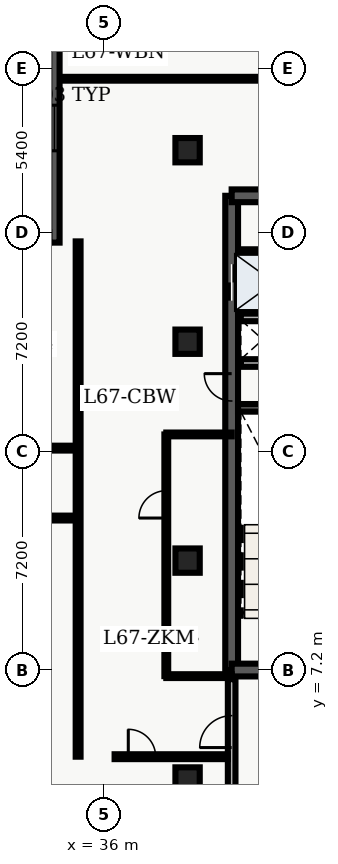
"""IFC4 building model, lengths in metres.
Left out: names, types, materials, properties, quantities, classifications, styles, units other than length and angle.
Written with IfcOpenShell. Run it as: python <this file> out.ifc"""

import sys

from ifc_helpers import new_model, entity, si_unit, converted_unit, direction, frame, origin_with_axes, origin_2d_with_axis, place, context, subcontext, project, spatial, polyline, rectangle, outline, extrude, element, fill, save


model = new_model("IFC4")
c1 = context("Model", 3, precision=1e-05, world=origin_with_axes(), true_north=direction((0.0, 1.0)))
c2 = subcontext(c1, "Body", "Model", "MODEL_VIEW")
j1 = project(units=[si_unit("LENGTHUNIT", "METRE"), converted_unit("PLANEANGLEUNIT", "DEGREE", entity("IfcPlaneAngleMeasure", 0.017), si_unit("PLANEANGLEUNIT", "RADIAN"), dimensions=[0, 0, 0, 0, 0, 0, 0])], contexts=[c1])
p1 = place(None, origin_with_axes())
s1 = spatial("IfcSite", under=j1, at=p1, CompositionType="ELEMENT")
p2 = place(p1, origin_with_axes())
s2 = spatial("IfcBuilding", under=s1, at=p2, CompositionType="ELEMENT")
p3 = place(p2, frame((0.0, 0.0, 272.4), z_axis=(0.0, 0.0, 1.0), x_axis=(1.0, 0.0, 0.0)))
s3 = spatial("IfcBuildingStorey", under=s2, at=p3, CompositionType="ELEMENT", Elevation=272.4)
p4 = place(p3, frame((40.2, 7.2, 0.0), z_axis=(0.0, 0.0, 1.0), x_axis=(0.0, 1.0, 0.0)))
e1 = element("IfcWall", 1, at=p4, inside=s3, PredefinedType="SHEAR", context=c2, shape_type="SweptSolid", body=[
    extrude(outline(polyline([(0.0, -0.21), (15.6, -0.21), (15.6, 0.21), (0.0, 0.21), (0.0, -0.21)])), origin_with_axes(), (0.0, 0.0, 1.0), 3.66),
])
p5 = place(p4, frame((12.75, 0.0, 0.0), z_axis=(0.0, 0.0, 1.0), x_axis=(1.0, 0.0, 0.0)))
e2 = element("IfcOpeningElement", 2, at=p5, cuts=e1, PredefinedType="OPENING", context=c2, shape_type="SweptSolid", body=[
    extrude(rectangle(XDim=1.2, YDim=0.44, at=origin_2d_with_axis()), origin_with_axes(), (0.0, 0.0, 1.0), 2.15),
])
p6 = place(p4, frame((9.3, 0.0, 0.0), z_axis=(0.0, 0.0, 1.0), x_axis=(1.0, 0.0, 0.0)))
e3 = element("IfcOpeningElement", 3, at=p6, cuts=e1, PredefinedType="OPENING", context=c2, shape_type="SweptSolid", body=[
    extrude(rectangle(XDim=0.9, YDim=0.44, at=origin_2d_with_axis()), origin_with_axes(), (0.0, 0.0, 1.0), 2.15),
])
p7 = place(p3, frame((40.2, 7.2, 0.0), z_axis=(0.0, 0.0, 1.0), x_axis=(1.0, 0.0, 0.0)))
e4 = element("IfcWall", 4, at=p7, inside=s3, PredefinedType="SHEAR", context=c2, shape_type="SweptSolid", body=[
    extrude(outline(polyline([(0.0, -0.21), (7.85, -0.21), (7.85, 0.21), (0.0, 0.21), (0.0, -0.21)])), origin_with_axes(), (0.0, 0.0, 1.0), 3.66),
])
p8 = place(p7, frame((2.175, 0.0, 0.0), z_axis=(0.0, 0.0, 1.0), x_axis=(1.0, 0.0, 0.0)))
e5 = element("IfcOpeningElement", 5, at=p8, cuts=e4, PredefinedType="OPENING", context=c2, shape_type="SweptSolid", body=[
    extrude(rectangle(XDim=1.05, YDim=0.44, at=origin_2d_with_axis()), origin_with_axes(), (0.0, 0.0, 1.0), 2.15),
])
p9 = place(p3, frame((40.2, 22.8, 0.0), z_axis=(0.0, 0.0, 1.0), x_axis=(1.0, 0.0, 0.0)))
e6 = element("IfcWall", 6, at=p9, inside=s3, PredefinedType="SHEAR", context=c2, shape_type="SweptSolid", body=[
    extrude(outline(polyline([(0.0, -0.21), (7.85, -0.21), (7.85, 0.21), (0.0, 0.21), (0.0, -0.21)])), origin_with_axes(), (0.0, 0.0, 1.0), 3.66),
])
p10 = place(p9, frame((5.775, 0.0, 0.0), z_axis=(0.0, 0.0, 1.0), x_axis=(1.0, 0.0, 0.0)))
e7 = element("IfcOpeningElement", 7, at=p10, cuts=e6, PredefinedType="OPENING", context=c2, shape_type="SweptSolid", body=[
    extrude(rectangle(XDim=1.05, YDim=0.44, at=origin_2d_with_axis()), origin_with_axes(), (0.0, 0.0, 1.0), 2.15),
])
p11 = place(p9, frame((2.15, 0.0, 0.0), z_axis=(0.0, 0.0, 1.0), x_axis=(1.0, 0.0, 0.0)))
e8 = element("IfcOpeningElement", 8, at=p11, cuts=e6, PredefinedType="OPENING", context=c2, shape_type="SweptSolid", body=[
    extrude(rectangle(XDim=0.9, YDim=0.44, at=origin_2d_with_axis()), origin_with_axes(), (0.0, 0.0, 1.0), 2.15),
])
p12 = place(p3, frame((40.41, 15.825, 0.0), z_axis=(0.0, 0.0, 1.0), x_axis=(1.0, 0.0, 0.0)))
e9 = element("IfcWall", 9, at=p12, inside=s3, PredefinedType="SHEAR", context=c2, shape_type="SweptSolid", body=[
    extrude(outline(polyline([(0.0, -0.125), (3.59, -0.125), (3.59, 0.125), (0.0, 0.125), (0.0, -0.125)])), origin_with_axes(), (0.0, 0.0, 1.0), 3.66),
])
p13 = place(p3, frame((40.5, 17.3, 0.0), z_axis=(0.0, 0.0, 1.0), x_axis=(1.0, 0.0, 0.0)))
e10 = element("IfcWall", 10, at=p13, inside=s3, PredefinedType="SOLIDWALL", context=c2, shape_type="SweptSolid", body=[
    extrude(outline(polyline([(0.0, -0.125), (3.5, -0.125), (3.5, 0.125), (0.0, 0.125), (0.0, -0.125)])), origin_with_axes(), (0.0, 0.0, 1.0), 2.7),
])
p14 = place(p13, frame((2.4, 0.0, 0.0), z_axis=(0.0, 0.0, 1.0), x_axis=(1.0, 0.0, 0.0)))
e11 = element("IfcOpeningElement", 11, at=p14, cuts=e10, PredefinedType="OPENING", context=c2, shape_type="SweptSolid", body=[
    extrude(rectangle(XDim=0.9, YDim=0.27, at=origin_2d_with_axis()), origin_with_axes(), (0.0, 0.0, 1.0), 2.15),
])
p15 = place(p3, frame((40.5, 18.8, 0.0), z_axis=(0.0, 0.0, 1.0), x_axis=(1.0, 0.0, 0.0)))
e12 = element("IfcWall", 12, at=p15, inside=s3, PredefinedType="SOLIDWALL", context=c2, shape_type="SweptSolid", body=[
    extrude(outline(polyline([(0.0, -0.125), (3.5, -0.125), (3.5, 0.125), (0.0, 0.125), (0.0, -0.125)])), origin_with_axes(), (0.0, 0.0, 1.0), 2.7),
])
p16 = place(p3, frame((40.2, 3.1, 0.0), z_axis=(0.0, 0.0, 1.0), x_axis=(0.0, 1.0, 0.0)))
e13 = element("IfcWall", 13, at=p16, inside=s3, PredefinedType="SOLIDWALL", context=c2, shape_type="SweptSolid", body=[
    extrude(outline(polyline([(0.0, -0.125), (3.8, -0.125), (3.8, 0.125), (0.0, 0.125), (0.0, -0.125)])), origin_with_axes(), (0.0, 0.0, 1.0), 2.7),
])
p17 = place(p16, frame((2.075, 0.0, 0.0), z_axis=(0.0, 0.0, 1.0), x_axis=(1.0, 0.0, 0.0)))
e14 = element("IfcOpeningElement", 14, at=p17, cuts=e13, PredefinedType="OPENING", context=c2, shape_type="SweptSolid", body=[
    extrude(rectangle(XDim=1.05, YDim=0.27, at=origin_2d_with_axis()), origin_with_axes(), (0.0, 0.0, 1.0), 2.15),
])
for number, where, z_axis, x_axis in (
    (15, (38.75, 3.6, 0.0), (0.0, 0.0, 1.0), (1.0, 0.0, 0.0)),
    (16, (38.75, 10.8, 0.0), (0.0, 0.0, 1.0), (1.0, 0.0, 0.0)),
    (17, (38.75, 18.0, 0.0), (0.0, 0.0, 1.0), (1.0, 0.0, 0.0)),
    (18, (38.75, 24.3, 0.0), (0.0, 0.0, 1.0), (1.0, 0.0, 0.0)),
):
    element("IfcColumn", number, at=place(p3, frame(where, z_axis=z_axis, x_axis=x_axis)), inside=s3, PredefinedType="COLUMN", context=c2, shape_type="SweptSolid", body=[
        extrude(rectangle(XDim=0.8, YDim=0.8, at=origin_2d_with_axis()), origin_with_axes(), (0.0, 0.0, 1.0), 3.9),
    ])
p18 = place(p3, frame((40.5, 20.96, 0.0), z_axis=(0.0, 0.0, 1.0), x_axis=(1.0, 0.0, 0.0)))
e19 = element("IfcWall", 19, at=p18, inside=s3, PredefinedType="PARTITIONING", context=c2, shape_type="SweptSolid", body=[
    extrude(outline(polyline([(0.0, -0.08), (3.5, -0.08), (3.5, 0.08), (0.0, 0.08), (0.0, -0.08)])), origin_with_axes(), (0.0, 0.0, 1.0), 2.7),
])
p19 = place(p3, frame((20.3, 12.2, 0.0), z_axis=(0.0, 0.0, 1.0), x_axis=(1.0, 0.0, 0.0)))
e20 = element("IfcWall", 20, at=p19, inside=s3, PredefinedType="PARTITIONING", context=c2, shape_type="SweptSolid", body=[
    extrude(outline(polyline([(0.0, -0.08), (14.85, -0.08), (14.85, 0.08), (0.0, 0.08), (0.0, -0.08)])), origin_with_axes(), (0.0, 0.0, 1.0), 2.7),
])
p20 = place(p19, frame((8.355, 0.0, 0.0), z_axis=(0.0, 0.0, 1.0), x_axis=(1.0, 0.0, 0.0)))
e21 = element("IfcOpeningElement", 21, at=p20, cuts=e20, PredefinedType="OPENING", context=c2, shape_type="SweptSolid", body=[
    extrude(rectangle(XDim=1.0, YDim=0.18, at=origin_2d_with_axis()), origin_with_axes(), (0.0, 0.0, 1.0), 2.15),
])
p21 = place(p3, frame((20.3, 14.5, 0.0), z_axis=(0.0, 0.0, 1.0), x_axis=(1.0, 0.0, 0.0)))
e22 = element("IfcWall", 22, at=p21, inside=s3, PredefinedType="PARTITIONING", context=c2, shape_type="SweptSolid", body=[
    extrude(outline(polyline([(0.0, -0.08), (14.85, -0.08), (14.85, 0.08), (0.0, 0.08), (0.0, -0.08)])), origin_with_axes(), (0.0, 0.0, 1.0), 2.7),
])
p22 = place(p21, frame((1.739, 0.0, 0.0), z_axis=(0.0, 0.0, 1.0), x_axis=(1.0, 0.0, 0.0)))
e23 = element("IfcOpeningElement", 23, at=p22, cuts=e22, PredefinedType="OPENING", context=c2, shape_type="SweptSolid", body=[
    extrude(rectangle(XDim=1.0, YDim=0.18, at=origin_2d_with_axis()), origin_with_axes(), (0.0, 0.0, 1.0), 2.15),
])
p23 = place(p21, frame((5.299, 0.0, 0.0), z_axis=(0.0, 0.0, 1.0), x_axis=(1.0, 0.0, 0.0)))
e24 = element("IfcOpeningElement", 24, at=p23, cuts=e22, PredefinedType="OPENING", context=c2, shape_type="SweptSolid", body=[
    extrude(rectangle(XDim=1.0, YDim=0.18, at=origin_2d_with_axis()), origin_with_axes(), (0.0, 0.0, 1.0), 2.15),
])
p24 = place(p21, frame((8.889, 0.0, 0.0), z_axis=(0.0, 0.0, 1.0), x_axis=(1.0, 0.0, 0.0)))
e25 = element("IfcOpeningElement", 25, at=p24, cuts=e22, PredefinedType="OPENING", context=c2, shape_type="SweptSolid", body=[
    extrude(rectangle(XDim=1.0, YDim=0.18, at=origin_2d_with_axis()), origin_with_axes(), (0.0, 0.0, 1.0), 2.15),
])
p25 = place(p21, frame((12.624, 0.0, 0.0), z_axis=(0.0, 0.0, 1.0), x_axis=(1.0, 0.0, 0.0)))
e26 = element("IfcOpeningElement", 26, at=p25, cuts=e22, PredefinedType="OPENING", context=c2, shape_type="SweptSolid", body=[
    extrude(rectangle(XDim=1.0, YDim=0.18, at=origin_2d_with_axis()), origin_with_axes(), (0.0, 0.0, 1.0), 2.15),
])
p26 = place(p3, frame((35.15, 4.35, 0.0), z_axis=(0.0, 0.0, 1.0), x_axis=(0.0, 1.0, 0.0)))
e27 = element("IfcWall", 27, at=p26, inside=s3, PredefinedType="PARTITIONING", context=c2, shape_type="SweptSolid", body=[
    extrude(outline(polyline([(0.0, -0.08), (16.95, -0.08), (16.95, 0.08), (0.0, 0.08), (0.0, -0.08)])), origin_with_axes(), (0.0, 0.0, 1.0), 2.7),
])
p27 = place(p3, frame((34.535, 26.65, 0.0), z_axis=(0.0, 0.0, 1.0), x_axis=(1.0, 0.0, 0.0)))
e28 = element("IfcWall", 28, at=p27, inside=s3, PredefinedType="PARTITIONING", context=c2, shape_type="SweptSolid", body=[
    extrude(outline(polyline([(0.0, -0.062), (12.995, -0.062), (12.995, 0.062), (0.0, 0.062), (0.0, -0.062)])), origin_with_axes(), (0.0, 0.0, 1.0), 2.7),
])
p28 = place(p27, frame((8.465, 0.0, 0.0), z_axis=(0.0, 0.0, 1.0), x_axis=(1.0, 0.0, 0.0)))
e29 = element("IfcOpeningElement", 29, at=p28, cuts=e28, PredefinedType="OPENING", context=c2, shape_type="SweptSolid", body=[
    extrude(rectangle(XDim=1.0, YDim=0.145, at=origin_2d_with_axis()), origin_with_axes(), (0.0, 0.0, 1.0), 2.15),
])
p29 = place(p3, frame((36.35, 4.35, 0.0), z_axis=(0.0, 0.0, 1.0), x_axis=(1.0, 0.0, 0.0)))
e30 = element("IfcWall", 30, at=p29, inside=s3, PredefinedType="PARTITIONING", context=c2, shape_type="SweptSolid", body=[
    extrude(outline(polyline([(0.0, -0.08), (3.725, -0.08), (3.725, 0.08), (0.0, 0.08), (0.0, -0.08)])), origin_with_axes(), (0.0, 0.0, 1.0), 2.7),
])
p30 = place(p29, frame((0.9, 0.0, 0.0), z_axis=(0.0, 0.0, 1.0), x_axis=(1.0, 0.0, 0.0)))
e31 = element("IfcOpeningElement", 31, at=p30, cuts=e30, PredefinedType="OPENING", context=c2, shape_type="SweptSolid", body=[
    extrude(rectangle(XDim=0.9, YDim=0.18, at=origin_2d_with_axis()), origin_with_axes(), (0.0, 0.0, 1.0), 2.15),
])
for number, where, z_axis, x_axis in (
    (32, (38.05, 7.0, 0.0), (0.0, 0.0, 1.0), (1.0, 0.0, 0.0)),
    (33, (38.05, 14.95, 0.0), (0.0, 0.0, 1.0), (1.0, 0.0, 0.0)),
):
    element("IfcWall", number, at=place(p3, frame(where, z_axis=z_axis, x_axis=x_axis)), inside=s3, PredefinedType="PARTITIONING", context=c2, shape_type="SweptSolid", body=[
        extrude(outline(polyline([(0.0, -0.062), (2.15, -0.062), (2.15, 0.062), (0.0, 0.062), (0.0, -0.062)])), origin_with_axes(), (0.0, 0.0, 1.0), 2.7),
    ])
p31 = place(p3, frame((38.05, 7.0, 0.0), z_axis=(0.0, 0.0, 1.0), x_axis=(0.0, 1.0, 0.0)))
e34 = element("IfcWall", 34, at=p31, inside=s3, PredefinedType="PARTITIONING", context=c2, shape_type="SweptSolid", body=[
    extrude(outline(polyline([(0.0, -0.062), (7.95, -0.062), (7.95, 0.062), (0.0, 0.062), (0.0, -0.062)])), origin_with_axes(), (0.0, 0.0, 1.0), 2.7),
])
p32 = place(p31, frame((5.65, 0.0, 0.0), z_axis=(0.0, 0.0, 1.0), x_axis=(1.0, 0.0, 0.0)))
e35 = element("IfcOpeningElement", 35, at=p32, cuts=e34, PredefinedType="OPENING", context=c2, shape_type="SweptSolid", body=[
    extrude(rectangle(XDim=0.9, YDim=0.145, at=origin_2d_with_axis()), origin_with_axes(), (0.0, 0.0, 1.0), 2.15),
])
p33 = place(p3, frame((34.37, 21.26, 0.0), z_axis=(0.0, 0.0, 1.0), x_axis=(0.0, 1.0, 0.0)))
e36 = element("IfcWall", 36, at=p33, inside=s3, PredefinedType="SOLIDWALL", context=c2, shape_type="SweptSolid", body=[
    extrude(outline(polyline([(0.0, -0.17), (7.54, -0.17), (7.54, 0.17), (0.0, 0.17), (0.0, -0.17)])), origin_with_axes(), (0.0, 0.0, 1.0), 3.66),
])
p34 = place(p33, frame((3.77, 0.0, 0.45), z_axis=(0.0, 0.0, 1.0), x_axis=(1.0, 0.0, 0.0)))
e37 = element("IfcOpeningElement", 37, at=p34, cuts=e36, PredefinedType="OPENING", context=c2, shape_type="SweptSolid", body=[
    extrude(rectangle(XDim=1.5, YDim=0.36, at=origin_2d_with_axis()), origin_with_axes(), (0.0, 0.0, 1.0), 2.1),
])
p35 = place(p4, frame((12.75, 0.0, 0.0), z_axis=(0.0, 0.0, 1.0), x_axis=(1.0, 0.0, 0.0)))
e38 = element("IfcDoor", 38, at=p35, inside=s3, OperationType="DOUBLE_DOOR_SLIDING", PredefinedType="DOOR", context=c2, shape_type="SweptSolid", body=[
    extrude(rectangle(XDim=1.2, YDim=0.09, at=origin_2d_with_axis()), origin_with_axes(), (0.0, 0.0, 1.0), 2.15),
])
fill(e2, e38)
p36 = place(p4, frame((9.3, 0.0, 0.0), z_axis=(0.0, 0.0, 1.0), x_axis=(1.0, 0.0, 0.0)))
e39 = element("IfcDoor", 39, at=p36, inside=s3, OperationType="SINGLE_SWING_RIGHT", PredefinedType="DOOR", context=c2, shape_type="SweptSolid", body=[
    extrude(rectangle(XDim=0.9, YDim=0.09, at=origin_2d_with_axis()), origin_with_axes(), (0.0, 0.0, 1.0), 2.15),
])
fill(e3, e39)
p37 = place(p16, frame((2.075, 0.0, 0.0), z_axis=(0.0, 0.0, 1.0), x_axis=(1.0, 0.0, 0.0)))
e40 = element("IfcDoor", 40, at=p37, inside=s3, OperationType="SINGLE_SWING_LEFT", PredefinedType="DOOR", context=c2, shape_type="SweptSolid", body=[
    extrude(rectangle(XDim=1.05, YDim=0.09, at=origin_2d_with_axis()), origin_with_axes(), (0.0, 0.0, 1.0), 2.15),
])
fill(e14, e40)
p38 = place(p29, frame((0.9, 0.0, 0.0), z_axis=(0.0, 0.0, 1.0), x_axis=(1.0, 0.0, 0.0)))
e41 = element("IfcDoor", 41, at=p38, inside=s3, OperationType="SINGLE_SWING_LEFT", PredefinedType="DOOR", context=c2, shape_type="SweptSolid", body=[
    extrude(rectangle(XDim=0.9, YDim=0.09, at=origin_2d_with_axis()), origin_with_axes(), (0.0, 0.0, 1.0), 2.15),
])
fill(e31, e41)
p39 = place(p31, frame((5.65, 0.0, 0.0), z_axis=(0.0, 0.0, 1.0), x_axis=(1.0, 0.0, 0.0)))
e42 = element("IfcDoor", 42, at=p39, inside=s3, OperationType="SINGLE_SWING_LEFT", PredefinedType="DOOR", context=c2, shape_type="SweptSolid", body=[
    extrude(rectangle(XDim=0.9, YDim=0.075, at=origin_2d_with_axis()), origin_with_axes(), (0.0, 0.0, 1.0), 2.15),
])
fill(e35, e42)
p40 = place(p33, frame((3.77, 0.0, 0.45), z_axis=(0.0, 0.0, 1.0), x_axis=(1.0, 0.0, 0.0)))
e43 = element("IfcWindow", 43, at=p40, inside=s3, PredefinedType="WINDOW", context=c2, shape_type="SweptSolid", body=[
    extrude(rectangle(XDim=1.5, YDim=0.09, at=origin_2d_with_axis()), origin_with_axes(), (0.0, 0.0, 1.0), 2.1),
])
fill(e37, e43)
save(model, sys.argv[1])
